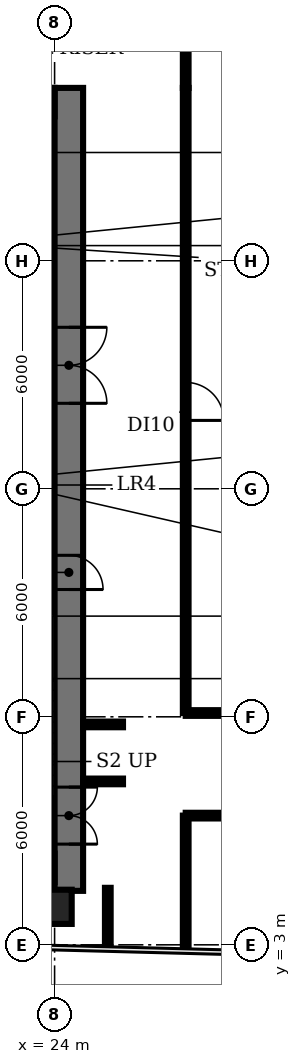
"""IFC4 building model, lengths in metres.
Left out: names, types, materials, properties, quantities, classifications, styles, units other than length and angle.
Written with IfcOpenShell. Run it as: python <this file> out.ifc"""

import sys

from ifc_helpers import new_model, si_unit, direction, frame, frame_2d, origin, origin_2d, place, context, subcontext, project, spatial, rectangle, extrude, element, fill, save


model = new_model("IFC4")
c1 = context("Model", 3, precision=1e-05, world=origin(), true_north=direction((0.0, 1.0)))
c2 = subcontext(c1, "Body", "Model", "MODEL_VIEW")
j1 = project(units=[si_unit("LENGTHUNIT", "METRE"), si_unit("PLANEANGLEUNIT", "RADIAN")], contexts=[c1])
p1 = place(None, origin())
s1 = spatial("IfcSite", under=j1, at=p1, CompositionType="ELEMENT")
p2 = place(p1, origin())
s2 = spatial("IfcBuilding", under=s1, at=p2, CompositionType="ELEMENT")
p3 = place(p2, frame((0.0, 0.0, 117.2)))
s3 = spatial("IfcBuildingStorey", under=s2, at=p3, CompositionType="ELEMENT", Elevation=117.2)
p4 = place(p3, frame((24.0, 4.0, 0.0), z_axis=(0.0, 0.0, 1.0), x_axis=(1.0, 0.0, 0.0)))
e1 = element("IfcColumn", 1, at=p4, inside=s3, PredefinedType="COLUMN", context=c2, shape_type="SweptSolid", body=[
    extrude(rectangle(XDim=0.9, YDim=0.9, at=origin_2d()), origin(), (0.0, 0.0, 1.0), 3.85),
])
p5 = place(p3, frame((20.85, 11.825, 0.0), z_axis=(0.0, 0.0, 1.0), x_axis=(1.0, 0.0, 0.0)))
e2 = element("IfcWall", 2, at=p5, inside=s3, PredefinedType="SHEAR", context=c2, shape_type="SweptSolid", body=[
    extrude(rectangle(XDim=3.15, YDim=0.25, at=frame_2d((1.575, 0.0))), origin(), (0.0, 0.0, 1.0), 3.85),
])
p6 = place(p3, frame((16.6, 13.7, 0.0), z_axis=(0.0, 0.0, 1.0), x_axis=(1.0, 0.0, 0.0)))
e3 = element("IfcWall", 3, at=p6, inside=s3, PredefinedType="PARTITIONING", context=c2, shape_type="SweptSolid", body=[
    extrude(rectangle(XDim=7.4, YDim=0.225, at=frame_2d((3.7, 0.0))), origin(), (0.0, 0.0, 1.0), 3.85),
])
p7 = place(p3, frame((9.4, 16.5, 0.0), z_axis=(0.0, 0.0, 1.0), x_axis=(1.0, 0.0, 0.0)))
e4 = element("IfcWall", 4, at=p7, inside=s3, PredefinedType="PARTITIONING", context=c2, shape_type="SweptSolid", body=[
    extrude(rectangle(XDim=14.6, YDim=0.225, at=frame_2d((7.3, 0.0))), origin(), (0.0, 0.0, 1.0), 3.85),
])
p8 = place(p7, frame((0.75, 0.0, 0.0)))
e5 = element("IfcOpeningElement", 5, at=p8, cuts=e4, PredefinedType="OPENING", context=c2, shape_type="SweptSolid", body=[
    extrude(rectangle(XDim=1.1, YDim=2.1, at=frame_2d((0.55, 1.05))), frame((0.0, 0.123, 0.0), z_axis=(0.0, -1.0, 0.0), x_axis=(1.0, 0.0, 0.0)), (0.0, 0.0, 1.0), 0.245),
])
p9 = place(p7, frame((3.55, 0.0, 0.0)))
e6 = element("IfcOpeningElement", 6, at=p9, cuts=e4, PredefinedType="OPENING", context=c2, shape_type="SweptSolid", body=[
    extrude(rectangle(XDim=1.1, YDim=2.1, at=frame_2d((0.55, 1.05))), frame((0.0, 0.123, 0.0), z_axis=(0.0, -1.0, 0.0), x_axis=(1.0, 0.0, 0.0)), (0.0, 0.0, 1.0), 0.245),
])
p10 = place(p7, frame((6.35, 0.0, 0.0)))
e7 = element("IfcOpeningElement", 7, at=p10, cuts=e4, PredefinedType="OPENING", context=c2, shape_type="SweptSolid", body=[
    extrude(rectangle(XDim=1.1, YDim=2.1, at=frame_2d((0.55, 1.05))), frame((0.0, 0.123, 0.0), z_axis=(0.0, -1.0, 0.0), x_axis=(1.0, 0.0, 0.0)), (0.0, 0.0, 1.0), 0.245),
])
p11 = place(p7, frame((9.15, 0.0, 0.0)))
e8 = element("IfcOpeningElement", 8, at=p11, cuts=e4, PredefinedType="OPENING", context=c2, shape_type="SweptSolid", body=[
    extrude(rectangle(XDim=1.1, YDim=2.1, at=frame_2d((0.55, 1.05))), frame((0.0, 0.123, 0.0), z_axis=(0.0, -1.0, 0.0), x_axis=(1.0, 0.0, 0.0)), (0.0, 0.0, 1.0), 0.245),
])
p12 = place(p7, frame((11.308, 0.0, 0.0)))
e9 = element("IfcOpeningElement", 9, at=p12, cuts=e4, PredefinedType="OPENING", context=c2, shape_type="SweptSolid", body=[
    extrude(rectangle(XDim=0.9, YDim=2.1, at=frame_2d((0.45, 1.05))), frame((0.0, 0.123, 0.0), z_axis=(0.0, -1.0, 0.0), x_axis=(1.0, 0.0, 0.0)), (0.0, 0.0, 1.0), 0.245),
])
p13 = place(p7, frame((13.083, 0.0, 0.0)))
e10 = element("IfcOpeningElement", 10, at=p13, cuts=e4, PredefinedType="OPENING", context=c2, shape_type="SweptSolid", body=[
    extrude(rectangle(XDim=0.9, YDim=2.1, at=frame_2d((0.45, 1.05))), frame((0.0, 0.123, 0.0), z_axis=(0.0, -1.0, 0.0), x_axis=(1.0, 0.0, 0.0)), (0.0, 0.0, 1.0), 0.245),
])
p14 = place(p3, frame((24.0, 20.0, 0.0), z_axis=(0.0, 0.0, 1.0), x_axis=(-1.0, 0.0, 0.0)))
e11 = element("IfcWall", 11, at=p14, inside=s3, PredefinedType="PARTITIONING", context=c2, shape_type="SweptSolid", body=[
    extrude(rectangle(XDim=14.6, YDim=0.225, at=frame_2d((7.3, 0.0))), origin(), (0.0, 0.0, 1.0), 3.85),
])
p15 = place(p14, frame((12.2, 0.0, 0.0)))
e12 = element("IfcOpeningElement", 12, at=p15, cuts=e11, PredefinedType="OPENING", context=c2, shape_type="SweptSolid", body=[
    extrude(rectangle(XDim=1.0, YDim=2.1, at=frame_2d((0.5, 1.05))), frame((0.0, 0.123, 0.0), z_axis=(0.0, -1.0, 0.0), x_axis=(1.0, 0.0, 0.0)), (0.0, 0.0, 1.0), 0.245),
])
p16 = place(p14, frame((9.025, 0.0, 0.0)))
e13 = element("IfcOpeningElement", 13, at=p16, cuts=e11, PredefinedType="OPENING", context=c2, shape_type="SweptSolid", body=[
    extrude(rectangle(XDim=0.9, YDim=2.1, at=frame_2d((0.45, 1.05))), frame((0.0, 0.123, 0.0), z_axis=(0.0, -1.0, 0.0), x_axis=(1.0, 0.0, 0.0)), (0.0, 0.0, 1.0), 0.245),
])
p17 = place(p14, frame((5.375, 0.0, 0.0)))
e14 = element("IfcOpeningElement", 14, at=p17, cuts=e11, PredefinedType="OPENING", context=c2, shape_type="SweptSolid", body=[
    extrude(rectangle(XDim=1.0, YDim=2.1, at=frame_2d((0.5, 1.05))), frame((0.0, 0.123, 0.0), z_axis=(0.0, -1.0, 0.0), x_axis=(1.0, 0.0, 0.0)), (0.0, 0.0, 1.0), 0.245),
])
p18 = place(p14, frame((2.308, 0.0, 0.0)))
e15 = element("IfcOpeningElement", 15, at=p18, cuts=e11, PredefinedType="OPENING", context=c2, shape_type="SweptSolid", body=[
    extrude(rectangle(XDim=0.9, YDim=2.1, at=frame_2d((0.45, 1.05))), frame((0.0, 0.123, 0.0), z_axis=(0.0, -1.0, 0.0), x_axis=(1.0, 0.0, 0.0)), (0.0, 0.0, 1.0), 0.245),
])
p19 = place(p14, frame((0.532, 0.0, 0.0)))
e16 = element("IfcOpeningElement", 16, at=p19, cuts=e11, PredefinedType="OPENING", context=c2, shape_type="SweptSolid", body=[
    extrude(rectangle(XDim=0.9, YDim=2.1, at=frame_2d((0.45, 1.05))), frame((0.0, 0.123, 0.0), z_axis=(0.0, -1.0, 0.0), x_axis=(1.0, 0.0, 0.0)), (0.0, 0.0, 1.0), 0.245),
])
p20 = place(p3, frame((9.4, 22.8, 0.0), z_axis=(0.0, 0.0, 1.0), x_axis=(1.0, 0.0, 0.0)))
e17 = element("IfcWall", 17, at=p20, inside=s3, PredefinedType="PARTITIONING", context=c2, shape_type="SweptSolid", body=[
    extrude(rectangle(XDim=14.6, YDim=0.225, at=frame_2d((7.3, 0.0))), origin(), (0.0, 0.0, 1.0), 3.85),
])
p21 = place(p3, frame((24.375, 25.55, 0.0), z_axis=(0.0, 0.0, 1.0), x_axis=(0.0, -1.0, 0.0)))
e18 = element("IfcWall", 18, at=p21, inside=s3, PredefinedType="SHEAR", context=c2, shape_type="SweptSolid", body=[
    extrude(rectangle(XDim=21.13, YDim=0.75, at=frame_2d((10.565, 0.0))), origin(), (0.0, 0.0, 1.0), 3.85),
])
p22 = place(p21, frame((18.4, 0.0, 0.0)))
e19 = element("IfcOpeningElement", 19, at=p22, cuts=e18, PredefinedType="OPENING", context=c2, shape_type="SweptSolid", body=[
    extrude(rectangle(XDim=1.5, YDim=2.1, at=frame_2d((0.75, 1.05))), frame((0.0, 0.385, 0.0), z_axis=(0.0, -1.0, 0.0), x_axis=(1.0, 0.0, 0.0)), (0.0, 0.0, 1.0), 0.77),
])
p23 = place(p21, frame((12.3, 0.0, 0.0)))
e20 = element("IfcOpeningElement", 20, at=p23, cuts=e18, PredefinedType="OPENING", context=c2, shape_type="SweptSolid", body=[
    extrude(rectangle(XDim=0.9, YDim=2.1, at=frame_2d((0.45, 1.05))), frame((0.0, 0.385, 0.0), z_axis=(0.0, -1.0, 0.0), x_axis=(1.0, 0.0, 0.0)), (0.0, 0.0, 1.0), 0.77),
])
p24 = place(p21, frame((6.3, 0.0, 0.0)))
e21 = element("IfcOpeningElement", 21, at=p24, cuts=e18, PredefinedType="OPENING", context=c2, shape_type="SweptSolid", body=[
    extrude(rectangle(XDim=2.0, YDim=2.1, at=frame_2d((1.0, 1.05))), frame((0.0, 0.385, 0.0), z_axis=(0.0, -1.0, 0.0), x_axis=(1.0, 0.0, 0.0)), (0.0, 0.0, 1.0), 0.77),
])
p25 = place(p3, frame((24.0, 5.025, 0.0), z_axis=(0.0, 0.0, 1.0), x_axis=(-1.0, 0.0, 0.0)))
e22 = element("IfcWall", 22, at=p25, inside=s3, PredefinedType="SHEAR", context=c2, shape_type="SweptSolid", body=[
    extrude(rectangle(XDim=18.0, YDim=0.75, at=frame_2d((9.0, 0.0))), origin(), (0.0, 0.0, 1.0), 3.85),
])
p26 = place(p25, frame((0.825, 0.0, 0.0)))
e23 = element("IfcOpeningElement", 23, at=p26, cuts=e22, PredefinedType="OPENING", context=c2, shape_type="SweptSolid", body=[
    extrude(rectangle(XDim=1.5, YDim=2.1, at=frame_2d((0.75, 1.05))), frame((0.0, 0.385, 0.0), z_axis=(0.0, -1.0, 0.0), x_axis=(1.0, 0.0, 0.0)), (0.0, 0.0, 1.0), 0.77),
])
p27 = place(p25, frame((15.675, 0.0, 0.0)))
e24 = element("IfcOpeningElement", 24, at=p27, cuts=e22, PredefinedType="OPENING", context=c2, shape_type="SweptSolid", body=[
    extrude(rectangle(XDim=1.5, YDim=2.1, at=frame_2d((0.75, 1.05))), frame((0.0, 0.385, 0.0), z_axis=(0.0, -1.0, 0.0), x_axis=(1.0, 0.0, 0.0)), (0.0, 0.0, 1.0), 0.77),
])
p28 = place(p25, frame((13.0, 0.0, 0.0)))
e25 = element("IfcOpeningElement", 25, at=p28, cuts=e22, PredefinedType="OPENING", context=c2, shape_type="SweptSolid", body=[
    extrude(rectangle(XDim=1.2, YDim=2.1, at=frame_2d((0.6, 1.05))), frame((0.0, 0.385, 0.0), z_axis=(0.0, -1.0, 0.0), x_axis=(1.0, 0.0, 0.0)), (0.0, 0.0, 1.0), 0.77),
])
p29 = place(p25, frame((4.35, 0.0, 0.0)))
e26 = element("IfcOpeningElement", 26, at=p29, cuts=e22, PredefinedType="OPENING", context=c2, shape_type="SweptSolid", body=[
    extrude(rectangle(XDim=1.0, YDim=2.1, at=frame_2d((0.5, 1.05))), frame((0.0, 0.385, 0.0), z_axis=(0.0, -1.0, 0.0), x_axis=(1.0, 0.0, 0.0)), (0.0, 0.0, 1.0), 0.77),
])
p30 = place(p3, frame((6.0, 25.175, 0.0), z_axis=(0.0, 0.0, 1.0), x_axis=(1.0, 0.0, 0.0)))
e27 = element("IfcWall", 27, at=p30, inside=s3, PredefinedType="SHEAR", context=c2, shape_type="SweptSolid", body=[
    extrude(rectangle(XDim=18.0, YDim=0.75, at=frame_2d((9.0, 0.0))), origin(), (0.0, 0.0, 1.0), 3.85),
])
for number, where, z_axis, x_axis in (
    (28, (24.75, 7.3, 0.0), (0.0, 0.0, 1.0), (1.0, 0.0, 0.0)),
    (29, (24.75, 8.8, 0.0), (0.0, 0.0, 1.0), (1.0, 0.0, 0.0)),
):
    element("IfcWall", number, at=place(p3, frame(where, z_axis=z_axis, x_axis=x_axis)), inside=s3, PredefinedType="PARTITIONING", context=c2, shape_type="SweptSolid", body=[
        extrude(rectangle(XDim=1.05, YDim=0.15, at=frame_2d((0.525, 0.0))), origin(), (0.0, 0.0, 1.0), 2.83),
    ])
p31 = place(p3, frame((25.4, 2.94, 0.0), z_axis=(0.0, 0.0, 1.0), x_axis=(0.0, 1.0, 0.0)))
e30 = element("IfcWall", 30, at=p31, inside=s3, PredefinedType="PARTITIONING", context=c2, shape_type="SweptSolid", body=[
    extrude(rectangle(XDim=1.56, YDim=0.15, at=frame_2d((0.78, 0.0))), origin(), (0.0, 0.0, 1.0), 2.83),
])
p32 = place(p3, frame((27.45, 2.88, 0.0), z_axis=(0.0, 0.0, 1.0), x_axis=(0.0, 1.0, 0.0)))
e31 = element("IfcWall", 31, at=p32, inside=s3, PredefinedType="PARTITIONING", context=c2, shape_type="SweptSolid", body=[
    extrude(rectangle(XDim=3.52, YDim=0.15, at=frame_2d((1.76, 0.0))), origin(), (0.0, 0.0, 1.0), 2.83),
])
p33 = place(p3, frame((27.45, 9.1, 0.0), z_axis=(0.0, 0.0, 1.0), x_axis=(1.0, 0.0, 0.0)))
e32 = element("IfcWall", 32, at=p33, inside=s3, PredefinedType="PARTITIONING", context=c2, shape_type="SweptSolid", body=[
    extrude(rectangle(XDim=8.55, YDim=0.15, at=frame_2d((4.275, 0.0))), origin(), (0.0, 0.0, 1.0), 2.83),
])
p34 = place(p3, frame((27.45, 25.55, 0.0), z_axis=(0.0, 0.0, 1.0), x_axis=(0.0, -1.0, 0.0)))
e33 = element("IfcWall", 33, at=p34, inside=s3, PredefinedType="PARTITIONING", context=c2, shape_type="SweptSolid", body=[
    extrude(rectangle(XDim=16.45, YDim=0.15, at=frame_2d((8.225, 0.0))), origin(), (0.0, 0.0, 1.0), 2.83),
])
p35 = place(p34, frame((7.75, 0.0, 0.0)))
e34 = element("IfcOpeningElement", 34, at=p35, cuts=e33, PredefinedType="OPENING", context=c2, shape_type="SweptSolid", body=[
    extrude(rectangle(XDim=1.0, YDim=2.1, at=frame_2d((0.5, 1.05))), frame((0.0, 0.085, 0.0), z_axis=(0.0, -1.0, 0.0), x_axis=(1.0, 0.0, 0.0)), (0.0, 0.0, 1.0), 0.17),
])
p36 = place(p3, frame((27.45, 25.55, 0.0), z_axis=(0.0, 0.0, 1.0), x_axis=(0.0, 1.0, 0.0)))
e35 = element("IfcWall", 35, at=p36, inside=s3, PredefinedType="PARTITIONING", context=c2, shape_type="SweptSolid", body=[
    extrude(rectangle(XDim=3.9, YDim=0.15, at=frame_2d((1.95, 0.0))), origin(), (0.0, 0.0, 1.0), 2.83),
])
p37 = place(p3, frame((42.0, 6.4, 0.0), z_axis=(0.0, 0.0, 1.0), x_axis=(-1.0, 0.0, 0.0)))
e36 = element("IfcWall", 36, at=p37, inside=s3, PredefinedType="PARTITIONING", context=c2, shape_type="SweptSolid", body=[
    extrude(rectangle(XDim=14.55, YDim=0.15, at=frame_2d((7.275, 0.0))), origin(), (0.0, 0.0, 1.0), 2.83),
])
p38 = place(p37, frame((7.45, 0.0, 0.0)))
e37 = element("IfcOpeningElement", 37, at=p38, cuts=e36, PredefinedType="OPENING", context=c2, shape_type="SweptSolid", body=[
    extrude(rectangle(XDim=1.2, YDim=2.1, at=frame_2d((0.6, 1.05))), frame((0.0, 0.085, 0.0), z_axis=(0.0, -1.0, 0.0), x_axis=(1.0, 0.0, 0.0)), (0.0, 0.0, 1.0), 0.17),
])
p39 = place(p22, origin())
e38 = element("IfcDoor", 38, at=p39, inside=s3, OperationType="DOUBLE_DOOR_SINGLE_SWING", PredefinedType="DOOR", context=c2, shape_type="SweptSolid", body=[
    extrude(rectangle(XDim=1.5, YDim=2.1, at=frame_2d((0.75, 1.05))), frame((0.0, 0.025, 0.0), z_axis=(0.0, -1.0, 0.0), x_axis=(1.0, 0.0, 0.0)), (0.0, 0.0, 1.0), 0.05),
])
fill(e19, e38)
p40 = place(p23, origin())
e39 = element("IfcDoor", 39, at=p40, inside=s3, OperationType="SINGLE_SWING_RIGHT", PredefinedType="DOOR", context=c2, shape_type="SweptSolid", body=[
    extrude(rectangle(XDim=0.9, YDim=2.1, at=frame_2d((0.45, 1.05))), frame((0.0, -0.315, 0.0), z_axis=(0.0, -1.0, 0.0), x_axis=(1.0, 0.0, 0.0)), (0.0, 0.0, 1.0), 0.05),
])
fill(e20, e39)
p41 = place(p24, origin())
e40 = element("IfcDoor", 40, at=p41, inside=s3, OperationType="DOUBLE_DOOR_SINGLE_SWING", PredefinedType="DOOR", context=c2, shape_type="SweptSolid", body=[
    extrude(rectangle(XDim=2.0, YDim=2.1, at=frame_2d((1.0, 1.05))), frame((0.0, 0.025, 0.0), z_axis=(0.0, -1.0, 0.0), x_axis=(1.0, 0.0, 0.0)), (0.0, 0.0, 1.0), 0.05),
])
fill(e21, e40)
p42 = place(p35, origin())
e41 = element("IfcDoor", 41, at=p42, inside=s3, OperationType="SINGLE_SWING_RIGHT", PredefinedType="DOOR", context=c2, shape_type="SweptSolid", body=[
    extrude(rectangle(XDim=1.0, YDim=2.1, at=frame_2d((0.5, 1.05))), frame((0.0, 0.025, 0.0), z_axis=(0.0, -1.0, 0.0), x_axis=(1.0, 0.0, 0.0)), (0.0, 0.0, 1.0), 0.05),
])
fill(e34, e41)
save(model, sys.argv[1])
